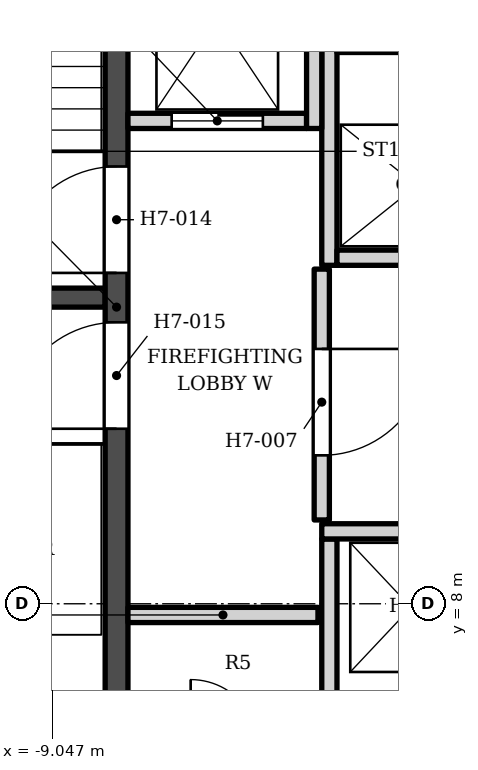
"""IFC4 building model, lengths in metres.
Left out: names, types, materials, properties, quantities, classifications, styles, units other than length and angle.
Written with IfcOpenShell. Run it as: python <this file> out.ifc"""

import sys

from ifc_helpers import new_model, si_unit, direction, frame, frame_2d, origin, place, context, subcontext, project, spatial, rectangle, extrude, element, fill, save


model = new_model("IFC4")
c1 = context("Model", 3, precision=1e-05, world=origin(), true_north=direction((0.0, 1.0)))
c2 = subcontext(c1, "Body", "Model", "MODEL_VIEW")
j1 = project(units=[si_unit("LENGTHUNIT", "METRE"), si_unit("PLANEANGLEUNIT", "RADIAN")], contexts=[c1])
p1 = place(None, origin())
s1 = spatial("IfcSite", under=j1, at=p1, CompositionType="ELEMENT")
p2 = place(p1, origin())
s2 = spatial("IfcBuilding", under=s1, at=p2, CompositionType="ELEMENT")
p3 = place(p2, frame((0.0, 0.0, 112.2)))
s3 = spatial("IfcBuildingStorey", under=s2, at=p3, CompositionType="ELEMENT", Elevation=112.2)
p4 = place(p3, frame((-8.2, 5.253, 0.0), z_axis=(0.0, 0.0, 1.0), x_axis=(0.0, 1.0, 0.0)))
e1 = element("IfcWall", 1, at=p4, inside=s3, PredefinedType="SHEAR", context=c2, shape_type="SweptSolid", body=[
    extrude(rectangle(XDim=13.3, YDim=0.3, at=frame_2d((6.65, 0.0))), origin(), (0.0, 0.0, 1.0), 3.4),
])
p5 = place(p4, frame((7.1, 0.0, 0.0)))
e2 = element("IfcOpeningElement", 2, at=p5, cuts=e1, PredefinedType="OPENING", context=c2, shape_type="SweptSolid", body=[
    extrude(rectangle(XDim=1.4, YDim=2.1, at=frame_2d((0.7, 1.05))), frame((0.0, 0.16, 0.0), z_axis=(0.0, -1.0, 0.0), x_axis=(1.0, 0.0, 0.0)), (0.0, 0.0, 1.0), 0.32),
])
p6 = place(p4, frame((5.05, 0.0, 0.0)))
e3 = element("IfcOpeningElement", 3, at=p6, cuts=e1, PredefinedType="OPENING", context=c2, shape_type="SweptSolid", body=[
    extrude(rectangle(XDim=1.4, YDim=2.1, at=frame_2d((0.7, 1.05))), frame((0.0, 0.16, 0.0), z_axis=(0.0, -1.0, 0.0), x_axis=(1.0, 0.0, 0.0)), (0.0, 0.0, 1.0), 0.32),
])
p7 = place(p3, frame((-12.1, 12.028, 0.0), z_axis=(0.0, 0.0, 1.0), x_axis=(1.0, 0.0, 0.0)))
e4 = element("IfcWall", 4, at=p7, inside=s3, PredefinedType="SHEAR", context=c2, shape_type="SweptSolid", body=[
    extrude(rectangle(XDim=3.75, YDim=0.25, at=frame_2d((1.875, 0.0))), origin(), (0.0, 0.0, 1.0), 3.4),
])
for number, where, z_axis, x_axis in (
    (5, (-5.4, 6.353, 0.0), (0.0, 0.0, 1.0), (0.0, 1.0, 0.0)),
    (6, (-8.05, 7.853, 0.0), (0.0, 0.0, 1.0), (1.0, 0.0, 0.0)),
):
    element("IfcWall", number, at=place(p3, frame(where, z_axis=z_axis, x_axis=x_axis)), inside=s3, PredefinedType="SOLIDWALL", context=c2, shape_type="SweptSolid", body=[
        extrude(rectangle(XDim=2.5, YDim=0.2, at=frame_2d((1.25, 0.0))), origin(), (0.0, 0.0, 1.0), 3.23),
    ])
p8 = place(p3, frame((-5.5, 8.953, 0.0), z_axis=(0.0, 0.0, 1.0), x_axis=(1.0, 0.0, 0.0)))
e7 = element("IfcWall", 7, at=p8, inside=s3, PredefinedType="SOLIDWALL", context=c2, shape_type="SweptSolid", body=[
    extrude(rectangle(XDim=4.5, YDim=0.2, at=frame_2d((2.25, 0.0))), origin(), (0.0, 0.0, 1.0), 3.23),
])
p9 = place(p3, frame((-5.5, 9.103, 0.0), z_axis=(0.0, 0.0, 1.0), x_axis=(0.0, 1.0, 0.0)))
e8 = element("IfcWall", 8, at=p9, inside=s3, PredefinedType="SOLIDWALL", context=c2, shape_type="SweptSolid", body=[
    extrude(rectangle(XDim=3.3, YDim=0.2, at=frame_2d((1.65, 0.0))), origin(), (0.0, 0.0, 1.0), 3.23),
])
p10 = place(p9, frame((0.85, 0.0, 0.0)))
e9 = element("IfcOpeningElement", 9, at=p10, cuts=e8, PredefinedType="OPENING", context=c2, shape_type="SweptSolid", body=[
    extrude(rectangle(XDim=1.4, YDim=2.1, at=frame_2d((0.7, 1.05))), frame((0.0, 0.11, 0.0), z_axis=(0.0, -1.0, 0.0), x_axis=(1.0, 0.0, 0.0)), (0.0, 0.0, 1.0), 0.22),
])
p11 = place(p3, frame((-5.4, 12.453, 0.0), z_axis=(0.0, 0.0, 1.0), x_axis=(0.0, 1.0, 0.0)))
e10 = element("IfcWall", 10, at=p11, inside=s3, PredefinedType="SOLIDWALL", context=c2, shape_type="SweptSolid", body=[
    extrude(rectangle(XDim=3.0, YDim=0.2, at=frame_2d((1.5, 0.0))), origin(), (0.0, 0.0, 1.0), 3.23),
])
p12 = place(p3, frame((-5.3, 12.552, 0.0), z_axis=(0.0, 0.0, 1.0), x_axis=(1.0, 0.0, 0.0)))
e11 = element("IfcWall", 11, at=p12, inside=s3, PredefinedType="SOLIDWALL", context=c2, shape_type="SweptSolid", body=[
    extrude(rectangle(XDim=2.1, YDim=0.2, at=frame_2d((1.05, 0.0))), origin(), (0.0, 0.0, 1.0), 3.23),
])
p13 = place(p3, frame((-8.05, 14.353, 0.0), z_axis=(0.0, 0.0, 1.0), x_axis=(1.0, 0.0, 0.0)))
e12 = element("IfcWall", 12, at=p13, inside=s3, PredefinedType="SOLIDWALL", context=c2, shape_type="SweptSolid", body=[
    extrude(rectangle(XDim=2.35, YDim=0.2, at=frame_2d((1.175, 0.0))), origin(), (0.0, 0.0, 1.0), 3.23),
])
p14 = place(p13, frame((0.575, 0.0, 0.0)))
e13 = element("IfcOpeningElement", 13, at=p14, cuts=e12, PredefinedType="OPENING", context=c2, shape_type="SweptSolid", body=[
    extrude(rectangle(XDim=1.2, YDim=2.1, at=frame_2d((0.6, 1.05))), frame((0.0, 0.11, 0.0), z_axis=(0.0, -1.0, 0.0), x_axis=(1.0, 0.0, 0.0)), (0.0, 0.0, 1.0), 0.22),
])
p15 = place(p3, frame((-5.6, 14.253, 0.0), z_axis=(0.0, 0.0, 1.0), x_axis=(0.0, 1.0, 0.0)))
e14 = element("IfcWall", 14, at=p15, inside=s3, PredefinedType="SOLIDWALL", context=c2, shape_type="SweptSolid", body=[
    extrude(rectangle(XDim=4.3, YDim=0.2, at=frame_2d((2.15, 0.0))), origin(), (0.0, 0.0, 1.0), 3.23),
])
p16 = place(p3, frame((-5.3, 15.353, 0.0), z_axis=(0.0, 0.0, 1.0), x_axis=(1.0, 0.0, 0.0)))
e15 = element("IfcWall", 15, at=p16, inside=s3, PredefinedType="SOLIDWALL", context=c2, shape_type="SweptSolid", body=[
    extrude(rectangle(XDim=2.1, YDim=0.2, at=frame_2d((1.05, 0.0))), origin(), (0.0, 0.0, 1.0), 3.23),
])
p17 = place(p14, origin())
e16 = element("IfcDoor", 16, at=p17, inside=s3, OperationType="DOUBLE_DOOR_SLIDING", PredefinedType="DOOR", context=c2, shape_type="SweptSolid", body=[
    extrude(rectangle(XDim=1.2, YDim=2.1, at=frame_2d((0.6, 1.05))), frame((0.0, 0.025, 0.0), z_axis=(0.0, -1.0, 0.0), x_axis=(1.0, 0.0, 0.0)), (0.0, 0.0, 1.0), 0.05),
])
fill(e13, e16)
p18 = place(p5, origin())
e17 = element("IfcDoor", 17, at=p18, inside=s3, OperationType="SINGLE_SWING_LEFT", PredefinedType="DOOR", context=c2, shape_type="SweptSolid", body=[
    extrude(rectangle(XDim=1.4, YDim=2.1, at=frame_2d((0.7, 1.05))), frame((0.0, 0.025, 0.0), z_axis=(0.0, -1.0, 0.0), x_axis=(1.0, 0.0, 0.0)), (0.0, 0.0, 1.0), 0.05),
])
fill(e2, e17)
p19 = place(p6, origin())
e18 = element("IfcDoor", 18, at=p19, inside=s3, OperationType="SINGLE_SWING_LEFT", PredefinedType="DOOR", context=c2, shape_type="SweptSolid", body=[
    extrude(rectangle(XDim=1.4, YDim=2.1, at=frame_2d((0.7, 1.05))), frame((0.0, 0.025, 0.0), z_axis=(0.0, -1.0, 0.0), x_axis=(1.0, 0.0, 0.0)), (0.0, 0.0, 1.0), 0.05),
])
fill(e3, e18)
p20 = place(p10, origin())
e19 = element("IfcDoor", 19, at=p20, inside=s3, OperationType="SINGLE_SWING_RIGHT", PredefinedType="DOOR", context=c2, shape_type="SweptSolid", body=[
    extrude(rectangle(XDim=1.4, YDim=2.1, at=frame_2d((0.7, 1.05))), frame((0.0, 0.025, 0.0), z_axis=(0.0, -1.0, 0.0), x_axis=(1.0, 0.0, 0.0)), (0.0, 0.0, 1.0), 0.05),
])
fill(e9, e19)
save(model, sys.argv[1])
